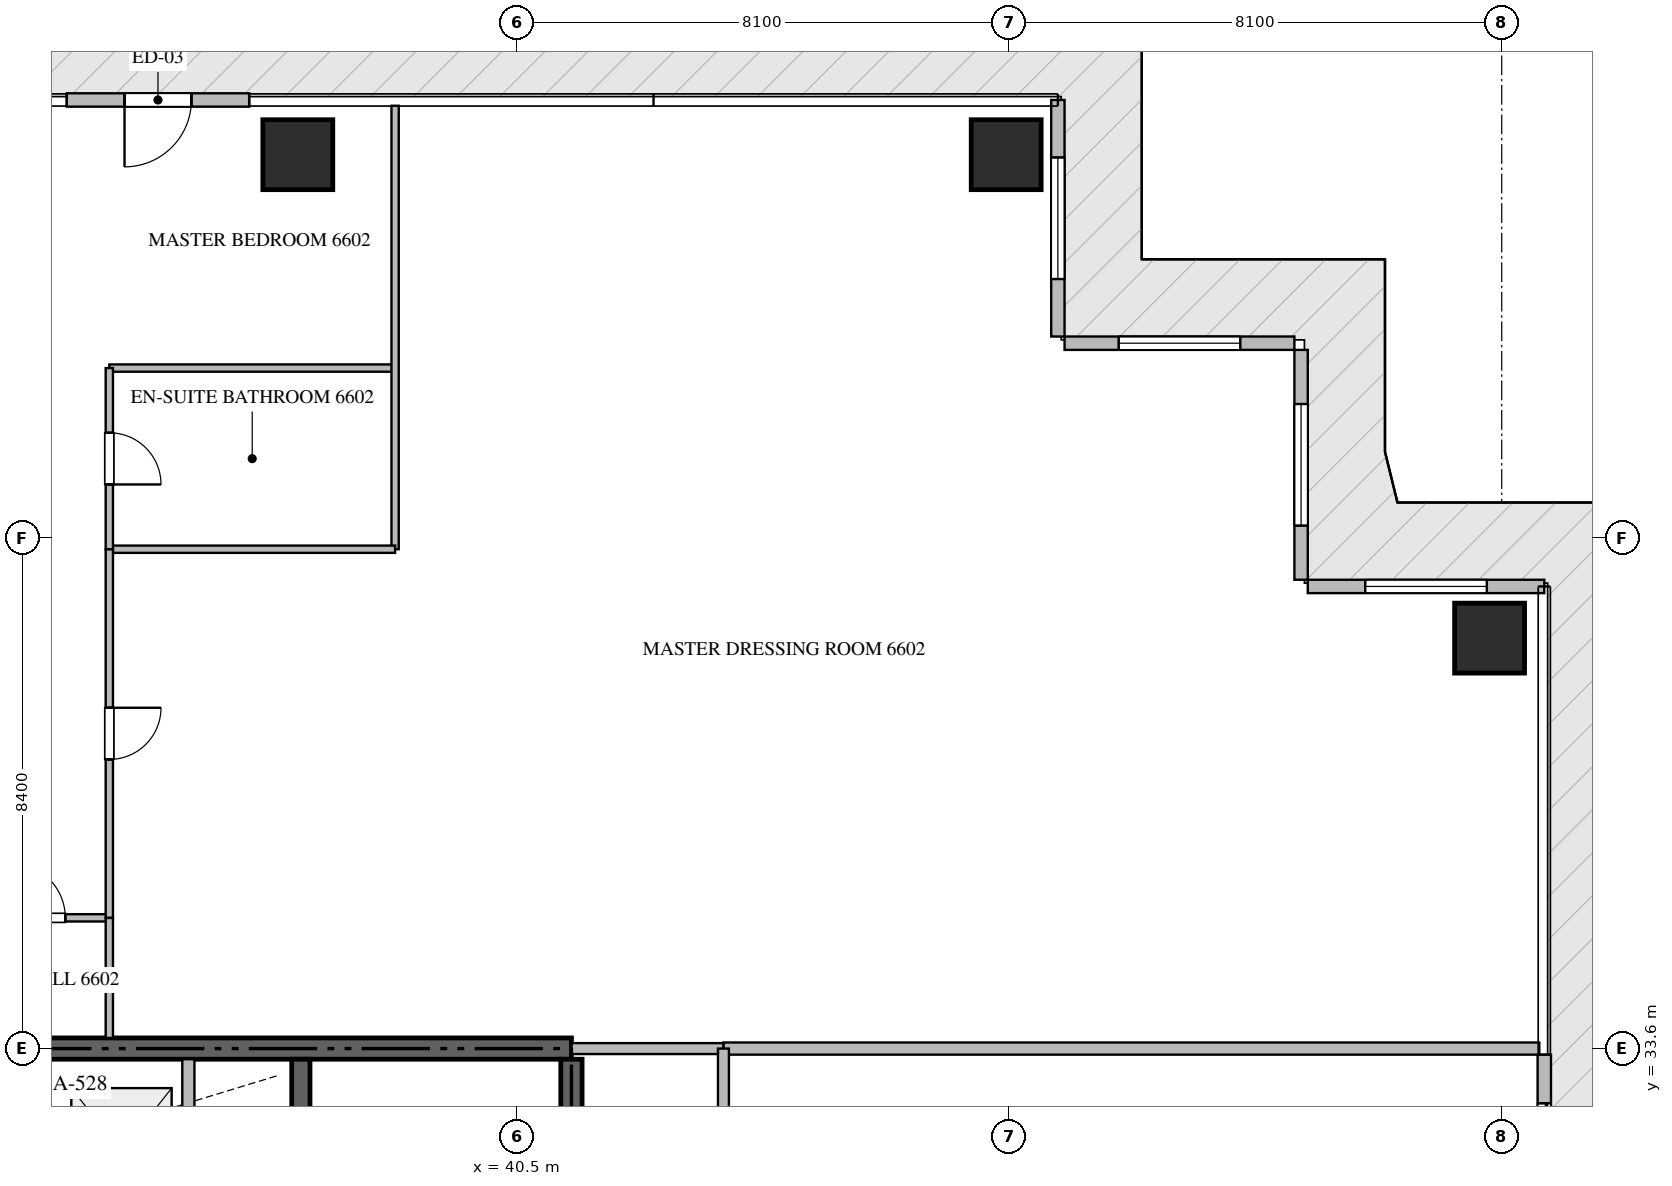
"""IFC4 building model, lengths in metres.
Left out: names, types, materials, properties, quantities, classifications, styles, units other than length and angle.
Written with IfcOpenShell. Run it as: python <this file> out.ifc"""

import sys

from ifc_helpers import new_model, si_unit, direction, frame, frame_2d, origin, origin_2d, place, context, subcontext, project, spatial, rectangle, extrude, source, transform, mapped, element, fill, save


model = new_model("IFC4")
c1 = context("Model", 3, precision=1e-05, world=origin(), true_north=direction((0.0, 1.0)))
c2 = subcontext(c1, "Body", "Model", "MODEL_VIEW")
j1 = project(units=[si_unit("LENGTHUNIT", "METRE"), si_unit("PLANEANGLEUNIT", "RADIAN")], contexts=[c1])
p1 = place(None, origin())
s1 = spatial("IfcSite", under=j1, at=p1, CompositionType="ELEMENT")
p2 = place(p1, origin())
s2 = spatial("IfcBuilding", under=s1, at=p2, CompositionType="ELEMENT")
p3 = place(p2, frame((0.0, 0.0, 264.35)))
s3 = spatial("IfcBuildingStorey", under=s2, at=p3, CompositionType="ELEMENT", Elevation=264.35)
p4 = place(p3, frame((41.4, 33.6, -0.26), z_axis=(0.0, 0.0, 1.0), x_axis=(-1.0, 0.0, 0.0)))
e1 = element("IfcWall", 1, at=p4, inside=s3, PredefinedType="SHEAR", context=c2, shape_type="SweptSolid", body=[
    extrude(rectangle(XDim=18.0, YDim=0.35, at=frame_2d((9.0, 0.0))), origin(), (0.0, 0.0, 1.0), 3.848),
])
p5 = place(p3, frame((41.4, 27.75, -0.26), z_axis=(0.0, 0.0, 1.0), x_axis=(0.0, 1.0, 0.0)))
e2 = element("IfcWall", 2, at=p5, inside=s3, PredefinedType="SHEAR", context=c2, shape_type="SweptSolid", body=[
    extrude(rectangle(XDim=5.675, YDim=0.35, at=frame_2d((2.837, 0.0))), origin(), (0.0, 0.0, 1.0), 3.848),
])
p6 = place(p3, frame((36.95, 27.05, -0.26), z_axis=(0.0, 0.0, 1.0), x_axis=(0.0, 1.0, 0.0)))
e3 = element("IfcWall", 3, at=p6, inside=s3, PredefinedType="SHEAR", context=c2, shape_type="SweptSolid", body=[
    extrude(rectangle(XDim=6.375, YDim=0.3, at=frame_2d((3.188, 0.0))), origin(), (0.0, 0.0, 1.0), 3.848),
])
m1 = source(origin(), c2, "Body", "SweptSolid", [
    extrude(rectangle(XDim=1.15, YDim=1.15, at=origin_2d()), origin(), (0.0, 0.0, 1.0), 3.85),
])
for number, where, z_axis, x_axis in (
    (4, (36.9, 48.3, -0.26), (0.0, 0.0, 1.0), (1.0, 0.0, 0.0)),
    (5, (48.55, 48.3, -0.26), (0.0, 0.0, 1.0), (1.0, 0.0, 0.0)),
    (6, (56.5, 40.35, -0.26), (0.0, 0.0, 1.0), (1.0, 0.0, 0.0)),
):
    element("IfcColumn", number, at=place(p3, frame(where, z_axis=z_axis, x_axis=x_axis)), inside=s3, PredefinedType="COLUMN", context=c2, shape_type="MappedRepresentation", body=[
        mapped(m1, transform((0.0, 0.0, 0.0), scale=1.0)),
    ])
p7 = place(p3, frame((57.4, 30.5, 0.0), z_axis=(0.0, 0.0, 1.0), x_axis=(0.0, 1.0, 0.0)))
e7 = element("IfcWall", 7, at=p7, inside=s3, PredefinedType="ELEMENTEDWALL", context=c2, shape_type="SweptSolid", body=[
    extrude(rectangle(XDim=3.0, YDim=0.22, at=frame_2d((1.5, 0.0))), origin(), (0.0, 0.0, 1.0), 3.575),
])
p8 = place(p7, frame((0.8, 0.0, 0.0)))
e8 = element("IfcOpeningElement", 8, at=p8, cuts=e7, PredefinedType="OPENING", context=c2, shape_type="SweptSolid", body=[
    extrude(rectangle(XDim=1.4, YDim=2.25, at=frame_2d((0.7, 1.125))), frame((0.0, 0.12, 0.0), z_axis=(0.0, -1.0, 0.0), x_axis=(1.0, 0.0, 0.0)), (0.0, 0.0, 1.0), 0.24),
])
p9 = place(p3, frame((57.4, 41.2, 0.0), z_axis=(0.0, 0.0, 1.0), x_axis=(-1.0, 0.0, 0.0)))
e9 = element("IfcWall", 9, at=p9, inside=s3, PredefinedType="ELEMENTEDWALL", context=c2, shape_type="SweptSolid", body=[
    extrude(rectangle(XDim=3.89, YDim=0.22, at=frame_2d((1.945, 0.0))), origin(), (0.0, 0.0, 1.0), 3.575),
])
p10 = place(p9, frame((0.945, 0.0, 0.65)))
e10 = element("IfcOpeningElement", 10, at=p10, cuts=e9, PredefinedType="OPENING", context=c2, shape_type="SweptSolid", body=[
    extrude(rectangle(XDim=2.0, YDim=2.2, at=frame_2d((1.0, 1.1))), frame((0.0, 0.12, 0.0), z_axis=(0.0, -1.0, 0.0), x_axis=(1.0, 0.0, 0.0)), (0.0, 0.0, 1.0), 0.24),
])
p11 = place(p3, frame((53.4, 41.31, 0.0), z_axis=(0.0, 0.0, 1.0), x_axis=(0.0, 1.0, 0.0)))
e11 = element("IfcWall", 11, at=p11, inside=s3, PredefinedType="ELEMENTEDWALL", context=c2, shape_type="SweptSolid", body=[
    extrude(rectangle(XDim=3.78, YDim=0.22, at=frame_2d((1.89, 0.0))), origin(), (0.0, 0.0, 1.0), 3.575),
])
p12 = place(p11, frame((0.89, 0.0, 0.65)))
e12 = element("IfcOpeningElement", 12, at=p12, cuts=e11, PredefinedType="OPENING", context=c2, shape_type="SweptSolid", body=[
    extrude(rectangle(XDim=2.0, YDim=2.2, at=frame_2d((1.0, 1.1))), frame((0.0, 0.12, 0.0), z_axis=(0.0, -1.0, 0.0), x_axis=(1.0, 0.0, 0.0)), (0.0, 0.0, 1.0), 0.24),
])
p13 = place(p3, frame((53.29, 45.2, 0.0), z_axis=(0.0, 0.0, 1.0), x_axis=(-1.0, 0.0, 0.0)))
e13 = element("IfcWall", 13, at=p13, inside=s3, PredefinedType="ELEMENTEDWALL", context=c2, shape_type="SweptSolid", body=[
    extrude(rectangle(XDim=3.78, YDim=0.22, at=frame_2d((1.89, 0.0))), origin(), (0.0, 0.0, 1.0), 3.575),
])
p14 = place(p13, frame((0.89, 0.0, 0.65)))
e14 = element("IfcOpeningElement", 14, at=p14, cuts=e13, PredefinedType="OPENING", context=c2, shape_type="SweptSolid", body=[
    extrude(rectangle(XDim=2.0, YDim=2.2, at=frame_2d((1.0, 1.1))), frame((0.0, 0.12, 0.0), z_axis=(0.0, -1.0, 0.0), x_axis=(1.0, 0.0, 0.0)), (0.0, 0.0, 1.0), 0.24),
])
p15 = place(p3, frame((49.4, 45.31, 0.0), z_axis=(0.0, 0.0, 1.0), x_axis=(0.0, 1.0, 0.0)))
e15 = element("IfcWall", 15, at=p15, inside=s3, PredefinedType="ELEMENTEDWALL", context=c2, shape_type="SweptSolid", body=[
    extrude(rectangle(XDim=3.89, YDim=0.22, at=frame_2d((1.945, 0.0))), origin(), (0.0, 0.0, 1.0), 3.575),
])
p16 = place(p15, frame((0.945, 0.0, 0.65)))
e16 = element("IfcOpeningElement", 16, at=p16, cuts=e15, PredefinedType="OPENING", context=c2, shape_type="SweptSolid", body=[
    extrude(rectangle(XDim=2.0, YDim=2.2, at=frame_2d((1.0, 1.1))), frame((0.0, 0.12, 0.0), z_axis=(0.0, -1.0, 0.0), x_axis=(1.0, 0.0, 0.0)), (0.0, 0.0, 1.0), 0.24),
])
p17 = place(p3, frame((36.1, 49.2, 0.0), z_axis=(0.0, 0.0, 1.0), x_axis=(-1.0, 0.0, 0.0)))
e17 = element("IfcWall", 17, at=p17, inside=s3, PredefinedType="ELEMENTEDWALL", context=c2, shape_type="SweptSolid", body=[
    extrude(rectangle(XDim=3.0, YDim=0.22, at=frame_2d((1.5, 0.0))), origin(), (0.0, 0.0, 1.0), 3.575),
])
p18 = place(p17, frame((0.95, 0.0, 0.0)))
e18 = element("IfcOpeningElement", 18, at=p18, cuts=e17, PredefinedType="OPENING", context=c2, shape_type="SweptSolid", body=[
    extrude(rectangle(XDim=1.1, YDim=2.2, at=frame_2d((0.55, 1.1))), frame((0.0, 0.12, 0.0), z_axis=(0.0, -1.0, 0.0), x_axis=(1.0, 0.0, 0.0)), (0.0, 0.0, 1.0), 0.24),
])
p19 = place(p3, frame((35.1, 30.75, 0.0), z_axis=(0.0, 0.0, 1.0), x_axis=(0.0, 1.0, 0.0)))
e19 = element("IfcWall", 19, at=p19, inside=s3, PredefinedType="STANDARD", context=c2, shape_type="SweptSolid", body=[
    extrude(rectangle(XDim=2.675, YDim=0.2, at=frame_2d((1.337, 0.0))), origin(), (0.0, 0.0, 1.0), 3.59),
])
p20 = place(p3, frame((43.9, 33.6, 0.0), z_axis=(0.0, 0.0, 1.0), x_axis=(1.0, 0.0, 0.0)))
e20 = element("IfcWall", 20, at=p20, inside=s3, PredefinedType="PARTITIONING", context=c2, shape_type="SweptSolid", body=[
    extrude(rectangle(XDim=13.418, YDim=0.2, at=frame_2d((6.709, 0.0))), origin(), (0.0, 0.0, 1.0), 3.59),
])
p21 = place(p3, frame((41.402, 33.6, 0.0), z_axis=(0.0, 0.0, 1.0), x_axis=(1.0, 0.0, 0.0)))
e21 = element("IfcWall", 21, at=p21, inside=s3, PredefinedType="PARTITIONING", context=c2, shape_type="SweptSolid", body=[
    extrude(rectangle(XDim=2.496, YDim=0.18, at=frame_2d((1.248, 0.0))), origin(), (0.0, 0.0, 1.0), 3.59),
])
p22 = place(p3, frame((43.9, 16.8, 0.0), z_axis=(0.0, 0.0, 1.0), x_axis=(0.0, 1.0, 0.0)))
e22 = element("IfcWall", 22, at=p22, inside=s3, PredefinedType="PARTITIONING", context=c2, shape_type="SweptSolid", body=[
    extrude(rectangle(XDim=16.8, YDim=0.18, at=frame_2d((8.4, 0.0))), origin(), (0.0, 0.0, 1.0), 3.59),
])
p23 = place(p22, frame((4.993, 0.0, 0.0)))
e23 = element("IfcOpeningElement", 23, at=p23, cuts=e22, PredefinedType="OPENING", context=c2, shape_type="SweptSolid", body=[
    extrude(rectangle(XDim=1.0, YDim=2.15, at=frame_2d((0.5, 1.075))), frame((0.0, 0.1, 0.0), z_axis=(0.0, -1.0, 0.0), x_axis=(1.0, 0.0, 0.0)), (0.0, 0.0, 1.0), 0.2),
])
p24 = place(p22, frame((13.351, 0.0, 0.0)))
e24 = element("IfcOpeningElement", 24, at=p24, cuts=e22, PredefinedType="OPENING", context=c2, shape_type="SweptSolid", body=[
    extrude(rectangle(XDim=1.0, YDim=2.15, at=frame_2d((0.5, 1.075))), frame((0.0, 0.1, 0.0), z_axis=(0.0, -1.0, 0.0), x_axis=(1.0, 0.0, 0.0)), (0.0, 0.0, 1.0), 0.2),
])
p25 = place(p3, frame((31.452, 35.75, 0.0), z_axis=(0.0, 0.0, 1.0), x_axis=(1.0, 0.0, 0.0)))
e25 = element("IfcWall", 25, at=p25, inside=s3, PredefinedType="PARTITIONING", context=c2, shape_type="SweptSolid", body=[
    extrude(rectangle(XDim=2.348, YDim=0.12, at=frame_2d((1.174, 0.0))), origin(), (0.0, 0.0, 1.0), 3.59),
])
p26 = place(p25, frame((0.724, 0.0, 0.0)))
e26 = element("IfcOpeningElement", 26, at=p26, cuts=e25, PredefinedType="OPENING", context=c2, shape_type="SweptSolid", body=[
    extrude(rectangle(XDim=0.9, YDim=2.1, at=frame_2d((0.45, 1.05))), frame((0.0, 0.07, 0.0), z_axis=(0.0, -1.0, 0.0), x_axis=(1.0, 0.0, 0.0)), (0.0, 0.0, 1.0), 0.14),
])
p27 = place(p3, frame((33.8, 44.791, 0.0), z_axis=(0.0, 0.0, 1.0), x_axis=(1.0, 0.0, 0.0)))
e27 = element("IfcWall", 27, at=p27, inside=s3, PredefinedType="PARTITIONING", context=c2, shape_type="SweptSolid", body=[
    extrude(rectangle(XDim=4.7, YDim=0.12, at=frame_2d((2.35, 0.0))), origin(), (0.0, 0.0, 1.0), 3.59),
])
p28 = place(p3, frame((38.5, 49.105, 0.0), z_axis=(0.0, 0.0, 1.0), x_axis=(0.0, -1.0, 0.0)))
e28 = element("IfcWall", 28, at=p28, inside=s3, PredefinedType="PARTITIONING", context=c2, shape_type="SweptSolid", body=[
    extrude(rectangle(XDim=7.293, YDim=0.12, at=frame_2d((3.646, 0.0))), origin(), (0.0, 0.0, 1.0), 3.59),
])
p29 = place(p3, frame((33.8, 41.812, 0.0), z_axis=(0.0, 0.0, 1.0), x_axis=(1.0, 0.0, 0.0)))
e29 = element("IfcWall", 29, at=p29, inside=s3, PredefinedType="PARTITIONING", context=c2, shape_type="SweptSolid", body=[
    extrude(rectangle(XDim=4.7, YDim=0.12, at=frame_2d((2.35, 0.0))), origin(), (0.0, 0.0, 1.0), 3.59),
])
p30 = place(p3, frame((33.8, 44.791, 0.0), z_axis=(0.0, 0.0, 1.0), x_axis=(0.0, -1.0, 0.0)))
e30 = element("IfcWall", 30, at=p30, inside=s3, PredefinedType="PARTITIONING", context=c2, shape_type="SweptSolid", body=[
    extrude(rectangle(XDim=2.979, YDim=0.12, at=frame_2d((1.49, 0.0))), origin(), (0.0, 0.0, 1.0), 3.59),
])
p31 = place(p30, frame((1.064, 0.0, 0.0)))
e31 = element("IfcOpeningElement", 31, at=p31, cuts=e30, PredefinedType="OPENING", context=c2, shape_type="SweptSolid", body=[
    extrude(rectangle(XDim=0.85, YDim=2.1, at=frame_2d((0.425, 1.05))), frame((0.0, 0.07, 0.0), z_axis=(0.0, -1.0, 0.0), x_axis=(1.0, 0.0, 0.0)), (0.0, 0.0, 1.0), 0.14),
])
p32 = place(p3, frame((33.8, 41.81, 0.0), z_axis=(0.0, 0.0, 1.0), x_axis=(0.0, -1.0, 0.0)))
e32 = element("IfcWall", 32, at=p32, inside=s3, PredefinedType="PARTITIONING", context=c2, shape_type="SweptSolid", body=[
    extrude(rectangle(XDim=6.06, YDim=0.12, at=frame_2d((3.03, 0.0))), origin(), (0.0, 0.0, 1.0), 3.59),
])
p33 = place(p32, frame((2.605, 0.0, 0.0)))
e33 = element("IfcOpeningElement", 33, at=p33, cuts=e32, PredefinedType="OPENING", context=c2, shape_type="SweptSolid", body=[
    extrude(rectangle(XDim=0.85, YDim=2.1, at=frame_2d((0.425, 1.05))), frame((0.0, 0.07, 0.0), z_axis=(0.0, -1.0, 0.0), x_axis=(1.0, 0.0, 0.0)), (0.0, 0.0, 1.0), 0.14),
])
p34 = place(p3, frame((33.8, 35.748, 0.0), z_axis=(0.0, 0.0, 1.0), x_axis=(0.0, -1.0, 0.0)))
e34 = element("IfcWall", 34, at=p34, inside=s3, PredefinedType="PARTITIONING", context=c2, shape_type="SweptSolid", body=[
    extrude(rectangle(XDim=1.973, YDim=0.12, at=frame_2d((0.987, 0.0))), origin(), (0.0, 0.0, 1.0), 3.59),
])
m2 = source(origin(), c2, "Body", "SweptSolid", [
    extrude(rectangle(XDim=1.4, YDim=2.25, at=frame_2d((0.7, 1.125))), frame((0.0, 0.025, 0.0), z_axis=(0.0, -1.0, 0.0), x_axis=(1.0, 0.0, 0.0)), (0.0, 0.0, 1.0), 0.05),
])
p35 = place(p8, origin())
e35 = element("IfcDoor", 35, at=p35, inside=s3, OperationType="SLIDING_TO_LEFT", PredefinedType="DOOR", context=c2, shape_type="MappedRepresentation", body=[
    mapped(m2, transform((0.0, 0.0, 0.0), scale=1.0)),
])
fill(e8, e35)
m3 = source(origin(), c2, "Body", "SweptSolid", [
    extrude(rectangle(XDim=2.0, YDim=2.2, at=frame_2d((1.0, 1.1))), frame((0.0, 0.03, 0.0), z_axis=(0.0, -1.0, 0.0), x_axis=(1.0, 0.0, 0.0)), (0.0, 0.0, 1.0), 0.06),
])
p36 = place(p10, origin())
e36 = element("IfcWindow", 36, at=p36, inside=s3, PartitioningType="SINGLE_PANEL", PredefinedType="WINDOW", context=c2, shape_type="MappedRepresentation", body=[
    mapped(m3, transform((0.0, 0.0, 0.0), scale=1.0)),
])
fill(e10, e36)
p37 = place(p12, origin())
e37 = element("IfcWindow", 37, at=p37, inside=s3, PartitioningType="SINGLE_PANEL", PredefinedType="WINDOW", context=c2, shape_type="MappedRepresentation", body=[
    mapped(m3, transform((0.0, 0.0, 0.0), scale=1.0)),
])
fill(e12, e37)
p38 = place(p14, origin())
e38 = element("IfcWindow", 38, at=p38, inside=s3, PartitioningType="SINGLE_PANEL", PredefinedType="WINDOW", context=c2, shape_type="MappedRepresentation", body=[
    mapped(m3, transform((0.0, 0.0, 0.0), scale=1.0)),
])
fill(e14, e38)
p39 = place(p16, origin())
e39 = element("IfcWindow", 39, at=p39, inside=s3, PartitioningType="SINGLE_PANEL", PredefinedType="WINDOW", context=c2, shape_type="MappedRepresentation", body=[
    mapped(m3, transform((0.0, 0.0, 0.0), scale=1.0)),
])
fill(e16, e39)
m4 = source(origin(), c2, "Body", "SweptSolid", [
    extrude(rectangle(XDim=1.1, YDim=2.2, at=frame_2d((0.55, 1.1))), frame((0.0, 0.025, 0.0), z_axis=(0.0, -1.0, 0.0), x_axis=(1.0, 0.0, 0.0)), (0.0, 0.0, 1.0), 0.05),
])
p40 = place(p18, origin())
e40 = element("IfcDoor", 40, at=p40, inside=s3, OperationType="SINGLE_SWING_RIGHT", PredefinedType="DOOR", context=c2, shape_type="MappedRepresentation", body=[
    mapped(m4, transform((0.0, 0.0, 0.0), scale=1.0)),
])
fill(e18, e40)
m5 = source(origin(), c2, "Body", "SweptSolid", [
    extrude(rectangle(XDim=0.9, YDim=2.1, at=frame_2d((0.45, 1.05))), frame((0.0, 0.025, 0.0), z_axis=(0.0, -1.0, 0.0), x_axis=(1.0, 0.0, 0.0)), (0.0, 0.0, 1.0), 0.05),
])
p41 = place(p26, origin())
e41 = element("IfcDoor", 41, at=p41, inside=s3, OperationType="SINGLE_SWING_LEFT", PredefinedType="DOOR", context=c2, shape_type="MappedRepresentation", body=[
    mapped(m5, transform((0.0, 0.0, 0.0), scale=1.0)),
])
fill(e26, e41)
m6 = source(origin(), c2, "Body", "SweptSolid", [
    extrude(rectangle(XDim=0.85, YDim=2.1, at=frame_2d((0.425, 1.05))), frame((0.0, 0.025, 0.0), z_axis=(0.0, -1.0, 0.0), x_axis=(1.0, 0.0, 0.0)), (0.0, 0.0, 1.0), 0.05),
])
p42 = place(p31, origin())
e42 = element("IfcDoor", 42, at=p42, inside=s3, OperationType="SINGLE_SWING_RIGHT", PredefinedType="DOOR", context=c2, shape_type="MappedRepresentation", body=[
    mapped(m6, transform((0.0, 0.0, 0.0), scale=1.0)),
])
fill(e31, e42)
p43 = place(p33, origin())
e43 = element("IfcDoor", 43, at=p43, inside=s3, OperationType="SINGLE_SWING_LEFT", PredefinedType="DOOR", context=c2, shape_type="MappedRepresentation", body=[
    mapped(m6, transform((0.0, 0.0, 0.0), scale=1.0)),
])
fill(e33, e43)
save(model, sys.argv[1])
